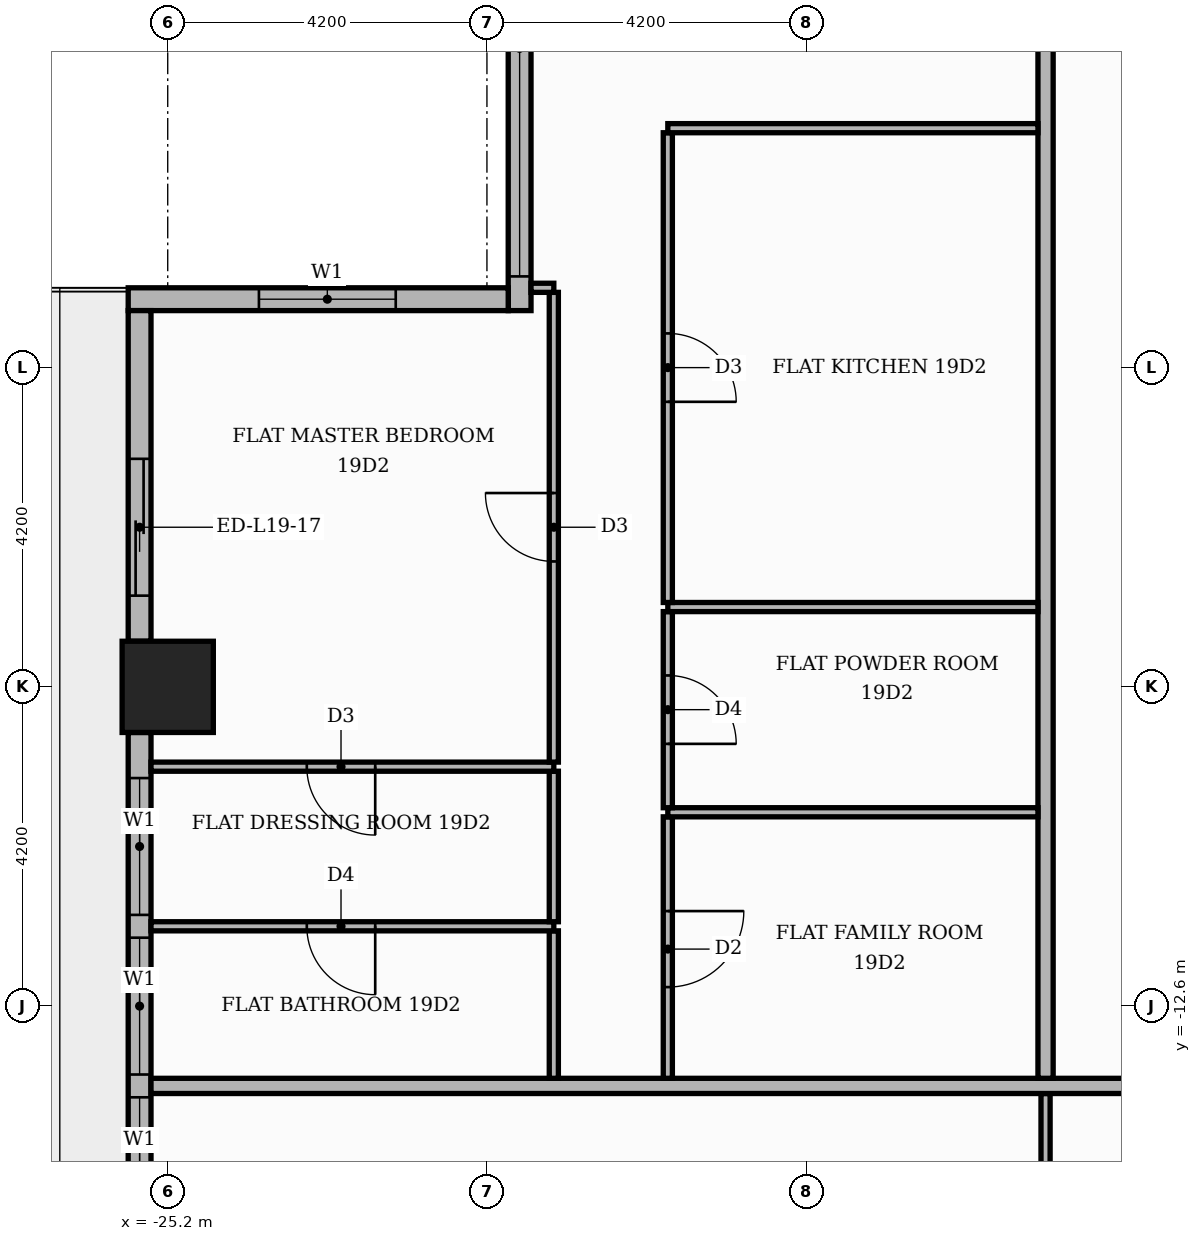
"""IFC4 building model, lengths in metres.
Left out: names, types, materials, properties, quantities, classifications, styles, units other than length and angle.
Written with IfcOpenShell. Run it as: python <this file> out.ifc"""

import sys

from ifc_helpers import new_model, si_unit, direction, frame, frame_2d, origin, origin_2d, place, context, subcontext, project, spatial, rectangle, extrude, element, fill, save


model = new_model("IFC4")
c1 = context("Model", 3, precision=1e-05, world=origin(), true_north=direction((0.0, 1.0)))
c2 = subcontext(c1, "Body", "Model", "MODEL_VIEW")
j1 = project(units=[si_unit("LENGTHUNIT", "METRE"), si_unit("PLANEANGLEUNIT", "RADIAN")], contexts=[c1])
p1 = place(None, origin())
s1 = spatial("IfcSite", under=j1, at=p1, CompositionType="ELEMENT")
p2 = place(p1, origin())
s2 = spatial("IfcBuilding", under=s1, at=p2, CompositionType="ELEMENT")
p3 = place(p2, frame((0.0, 0.0, 83.1)))
s3 = spatial("IfcBuildingStorey", under=s2, at=p3, CompositionType="ELEMENT", Elevation=83.1)
p4 = place(p3, frame((-25.2, -8.4, 0.0), z_axis=(0.0, 0.0, 1.0), x_axis=(1.0, 0.0, 0.0)))
e1 = element("IfcColumn", 1, at=p4, inside=s3, PredefinedType="COLUMN", context=c2, shape_type="SweptSolid", body=[
    extrude(rectangle(XDim=1.2, YDim=1.2, at=origin_2d()), origin(), (0.0, 0.0, 1.0), 3.9),
])
p5 = place(p3, frame((-20.57, 3.15, 0.0), z_axis=(0.0, 0.0, 1.0), x_axis=(0.0, -1.0, 0.0)))
e2 = element("IfcWall", 2, at=p5, inside=s3, PredefinedType="STANDARD", context=c2, shape_type="SweptSolid", body=[
    extrude(rectangle(XDim=6.6, YDim=0.3, at=frame_2d((3.3, 0.0))), origin(), (0.0, 0.0, 1.0), 3.48),
])
p6 = place(p5, frame((0.15, 0.0, 0.9)))
e3 = element("IfcOpeningElement", 3, at=p6, cuts=e2, PredefinedType="OPENING", context=c2, shape_type="SweptSolid", body=[
    extrude(rectangle(XDim=6.0, YDim=2.1, at=frame_2d((3.0, 1.05))), frame((0.0, 0.16, 0.0), z_axis=(0.0, -1.0, 0.0), x_axis=(1.0, 0.0, 0.0)), (0.0, 0.0, 1.0), 0.32),
])
p7 = place(p3, frame((-20.72, -3.3, 0.0), z_axis=(0.0, 0.0, 1.0), x_axis=(-1.0, 0.0, 0.0)))
e4 = element("IfcWall", 4, at=p7, inside=s3, PredefinedType="STANDARD", context=c2, shape_type="SweptSolid", body=[
    extrude(rectangle(XDim=5.0, YDim=0.3, at=frame_2d((2.5, 0.0))), origin(), (0.0, 0.0, 1.0), 3.48),
])
p8 = place(p7, frame((1.48, 0.0, 0.9)))
e5 = element("IfcOpeningElement", 5, at=p8, cuts=e4, PredefinedType="OPENING", context=c2, shape_type="SweptSolid", body=[
    extrude(rectangle(XDim=1.8, YDim=2.1, at=frame_2d((0.9, 1.05))), frame((0.0, 0.16, 0.0), z_axis=(0.0, -1.0, 0.0), x_axis=(1.0, 0.0, 0.0)), (0.0, 0.0, 1.0), 0.32),
])
p9 = place(p3, frame((-25.57, -3.45, 0.0), z_axis=(0.0, 0.0, 1.0), x_axis=(0.0, -1.0, 0.0)))
e6 = element("IfcWall", 6, at=p9, inside=s3, PredefinedType="STANDARD", context=c2, shape_type="SweptSolid", body=[
    extrude(rectangle(XDim=4.35, YDim=0.3, at=frame_2d((2.175, 0.0))), origin(), (0.0, 0.0, 1.0), 3.48),
])
p10 = place(p9, frame((1.95, 0.0, 0.0)))
e7 = element("IfcOpeningElement", 7, at=p10, cuts=e6, PredefinedType="OPENING", context=c2, shape_type="SweptSolid", body=[
    extrude(rectangle(XDim=1.8, YDim=2.4, at=frame_2d((0.9, 1.2))), frame((0.0, 0.16, 0.0), z_axis=(0.0, -1.0, 0.0), x_axis=(1.0, 0.0, 0.0)), (0.0, 0.0, 1.0), 0.32),
])
p11 = place(p3, frame((-25.57, -9.0, 0.0), z_axis=(0.0, 0.0, 1.0), x_axis=(0.0, -1.0, 0.0)))
e8 = element("IfcWall", 8, at=p11, inside=s3, PredefinedType="STANDARD", context=c2, shape_type="SweptSolid", body=[
    extrude(rectangle(XDim=7.2, YDim=0.3, at=frame_2d((3.6, 0.0))), origin(), (0.0, 0.0, 1.0), 3.48),
])
p12 = place(p11, frame((0.6, 0.0, 0.9)))
e9 = element("IfcOpeningElement", 9, at=p12, cuts=e8, PredefinedType="OPENING", context=c2, shape_type="SweptSolid", body=[
    extrude(rectangle(XDim=1.8, YDim=2.1, at=frame_2d((0.9, 1.05))), frame((0.0, 0.16, 0.0), z_axis=(0.0, -1.0, 0.0), x_axis=(1.0, 0.0, 0.0)), (0.0, 0.0, 1.0), 0.32),
])
p13 = place(p11, frame((2.7, 0.0, 0.9)))
e10 = element("IfcOpeningElement", 10, at=p13, cuts=e8, PredefinedType="OPENING", context=c2, shape_type="SweptSolid", body=[
    extrude(rectangle(XDim=1.8, YDim=2.1, at=frame_2d((0.9, 1.05))), frame((0.0, 0.16, 0.0), z_axis=(0.0, -1.0, 0.0), x_axis=(1.0, 0.0, 0.0)), (0.0, 0.0, 1.0), 0.32),
])
p14 = place(p11, frame((4.8, 0.0, 0.9)))
e11 = element("IfcOpeningElement", 11, at=p14, cuts=e8, PredefinedType="OPENING", context=c2, shape_type="SweptSolid", body=[
    extrude(rectangle(XDim=1.8, YDim=2.1, at=frame_2d((0.9, 1.05))), frame((0.0, 0.16, 0.0), z_axis=(0.0, -1.0, 0.0), x_axis=(1.0, 0.0, 0.0)), (0.0, 0.0, 1.0), 0.32),
])
p15 = place(p3, frame((-13.65, -20.66, 0.0), z_axis=(0.0, 0.0, 1.0), x_axis=(0.0, 1.0, 0.0)))
e12 = element("IfcWall", 12, at=p15, inside=s3, PredefinedType="PARTITIONING", context=c2, shape_type="SweptSolid", body=[
    extrude(rectangle(XDim=6.91, YDim=0.12, at=frame_2d((3.455, 0.0))), origin(), (0.0, 0.0, 1.0), 3.48),
])
p16 = place(p15, frame((3.025, 0.0, 0.0)))
e13 = element("IfcOpeningElement", 13, at=p16, cuts=e12, PredefinedType="OPENING", context=c2, shape_type="SweptSolid", body=[
    extrude(rectangle(XDim=0.9, YDim=2.1, at=frame_2d((0.45, 1.05))), frame((0.0, 0.07, 0.0), z_axis=(0.0, -1.0, 0.0), x_axis=(1.0, 0.0, 0.0)), (0.0, 0.0, 1.0), 0.14),
])
p17 = place(p3, frame((-25.42, -13.65, 0.0), z_axis=(0.0, 0.0, 1.0), x_axis=(1.0, 0.0, 0.0)))
e14 = element("IfcWall", 14, at=p17, inside=s3, PredefinedType="PARTITIONING", context=c2, shape_type="SweptSolid", body=[
    extrude(rectangle(XDim=39.07, YDim=0.2, at=frame_2d((19.535, 0.0))), origin(), (0.0, 0.0, 1.0), 3.48),
])
p18 = place(p17, frame((14.37, 0.0, 0.0)))
e15 = element("IfcOpeningElement", 15, at=p18, cuts=e14, PredefinedType="OPENING", context=c2, shape_type="SweptSolid", body=[
    extrude(rectangle(XDim=1.1, YDim=2.4, at=frame_2d((0.55, 1.2))), frame((0.0, 0.11, 0.0), z_axis=(0.0, -1.0, 0.0), x_axis=(1.0, 0.0, 0.0)), (0.0, 0.0, 1.0), 0.22),
])
p19 = place(p3, frame((-20.12, -13.55, 0.0), z_axis=(0.0, 0.0, 1.0), x_axis=(0.0, 1.0, 0.0)))
e16 = element("IfcWall", 16, at=p19, inside=s3, PredefinedType="PARTITIONING", context=c2, shape_type="SweptSolid", body=[
    extrude(rectangle(XDim=1.94, YDim=0.12, at=frame_2d((0.97, 0.0))), origin(), (0.0, 0.0, 1.0), 3.48),
])
p20 = place(p3, frame((-18.62, -13.55, 0.0), z_axis=(0.0, 0.0, 1.0), x_axis=(0.0, 1.0, 0.0)))
e17 = element("IfcWall", 17, at=p20, inside=s3, PredefinedType="PARTITIONING", context=c2, shape_type="SweptSolid", body=[
    extrude(rectangle(XDim=3.44, YDim=0.12, at=frame_2d((1.72, 0.0))), origin(), (0.0, 0.0, 1.0), 3.48),
])
p21 = place(p20, frame((1.2, 0.0, 0.0)))
e18 = element("IfcOpeningElement", 18, at=p21, cuts=e17, PredefinedType="OPENING", context=c2, shape_type="SweptSolid", body=[
    extrude(rectangle(XDim=1.0, YDim=2.1, at=frame_2d((0.5, 1.05))), frame((0.0, 0.07, 0.0), z_axis=(0.0, -1.0, 0.0), x_axis=(1.0, 0.0, 0.0)), (0.0, 0.0, 1.0), 0.14),
])
p22 = place(p3, frame((-13.65, -13.55, 0.0), z_axis=(0.0, 0.0, 1.0), x_axis=(0.0, 1.0, 0.0)))
e19 = element("IfcWall", 19, at=p22, inside=s3, PredefinedType="PARTITIONING", context=c2, shape_type="SweptSolid", body=[
    extrude(rectangle(XDim=18.7, YDim=0.2, at=frame_2d((9.35, 0.0))), origin(), (0.0, 0.0, 1.0), 3.48),
])
p23 = place(p22, frame((14.05, 0.0, 0.0)))
e20 = element("IfcOpeningElement", 20, at=p23, cuts=e19, PredefinedType="OPENING", context=c2, shape_type="SweptSolid", body=[
    extrude(rectangle(XDim=1.1, YDim=2.4, at=frame_2d((0.55, 1.2))), frame((0.0, 0.11, 0.0), z_axis=(0.0, -1.0, 0.0), x_axis=(1.0, 0.0, 0.0)), (0.0, 0.0, 1.0), 0.22),
])
p24 = place(p3, frame((-25.42, -11.55, 0.0), z_axis=(0.0, 0.0, 1.0), x_axis=(1.0, 0.0, 0.0)))
e21 = element("IfcWall", 21, at=p24, inside=s3, PredefinedType="PARTITIONING", context=c2, shape_type="SweptSolid", body=[
    extrude(rectangle(XDim=5.3, YDim=0.12, at=frame_2d((2.65, 0.0))), origin(), (0.0, 0.0, 1.0), 3.48),
])
p25 = place(p24, frame((2.05, 0.0, 0.0)))
e22 = element("IfcOpeningElement", 22, at=p25, cuts=e21, PredefinedType="OPENING", context=c2, shape_type="SweptSolid", body=[
    extrude(rectangle(XDim=0.9, YDim=2.1, at=frame_2d((0.45, 1.05))), frame((0.0, 0.07, 0.0), z_axis=(0.0, -1.0, 0.0), x_axis=(1.0, 0.0, 0.0)), (0.0, 0.0, 1.0), 0.14),
])
p26 = place(p3, frame((-20.12, -11.49, 0.0), z_axis=(0.0, 0.0, 1.0), x_axis=(0.0, 1.0, 0.0)))
e23 = element("IfcWall", 23, at=p26, inside=s3, PredefinedType="PARTITIONING", context=c2, shape_type="SweptSolid", body=[
    extrude(rectangle(XDim=1.98, YDim=0.12, at=frame_2d((0.99, 0.0))), origin(), (0.0, 0.0, 1.0), 3.48),
])
p27 = place(p3, frame((-18.62, -10.05, 0.0), z_axis=(0.0, 0.0, 1.0), x_axis=(1.0, 0.0, 0.0)))
e24 = element("IfcWall", 24, at=p27, inside=s3, PredefinedType="PARTITIONING", context=c2, shape_type="SweptSolid", body=[
    extrude(rectangle(XDim=4.87, YDim=0.12, at=frame_2d((2.435, 0.0))), origin(), (0.0, 0.0, 1.0), 3.48),
])
p28 = place(p3, frame((-18.62, -9.99, 0.0), z_axis=(0.0, 0.0, 1.0), x_axis=(0.0, 1.0, 0.0)))
e25 = element("IfcWall", 25, at=p28, inside=s3, PredefinedType="PARTITIONING", context=c2, shape_type="SweptSolid", body=[
    extrude(rectangle(XDim=2.58, YDim=0.12, at=frame_2d((1.29, 0.0))), origin(), (0.0, 0.0, 1.0), 3.48),
])
p29 = place(p28, frame((0.84, 0.0, 0.0)))
e26 = element("IfcOpeningElement", 26, at=p29, cuts=e25, PredefinedType="OPENING", context=c2, shape_type="SweptSolid", body=[
    extrude(rectangle(XDim=0.9, YDim=2.1, at=frame_2d((0.45, 1.05))), frame((0.0, 0.07, 0.0), z_axis=(0.0, -1.0, 0.0), x_axis=(1.0, 0.0, 0.0)), (0.0, 0.0, 1.0), 0.14),
])
p30 = place(p3, frame((-25.42, -9.45, 0.0), z_axis=(0.0, 0.0, 1.0), x_axis=(1.0, 0.0, 0.0)))
e27 = element("IfcWall", 27, at=p30, inside=s3, PredefinedType="PARTITIONING", context=c2, shape_type="SweptSolid", body=[
    extrude(rectangle(XDim=5.3, YDim=0.12, at=frame_2d((2.65, 0.0))), origin(), (0.0, 0.0, 1.0), 3.48),
])
p31 = place(p30, frame((2.05, 0.0, 0.0)))
e28 = element("IfcOpeningElement", 28, at=p31, cuts=e27, PredefinedType="OPENING", context=c2, shape_type="SweptSolid", body=[
    extrude(rectangle(XDim=0.9, YDim=2.1, at=frame_2d((0.45, 1.05))), frame((0.0, 0.07, 0.0), z_axis=(0.0, -1.0, 0.0), x_axis=(1.0, 0.0, 0.0)), (0.0, 0.0, 1.0), 0.14),
])
p32 = place(p3, frame((-20.12, -9.39, 0.0), z_axis=(0.0, 0.0, 1.0), x_axis=(0.0, 1.0, 0.0)))
e29 = element("IfcWall", 29, at=p32, inside=s3, PredefinedType="PARTITIONING", context=c2, shape_type="SweptSolid", body=[
    extrude(rectangle(XDim=6.18, YDim=0.12, at=frame_2d((3.09, 0.0))), origin(), (0.0, 0.0, 1.0), 3.48),
])
p33 = place(p32, frame((2.64, 0.0, 0.0)))
e30 = element("IfcOpeningElement", 30, at=p33, cuts=e29, PredefinedType="OPENING", context=c2, shape_type="SweptSolid", body=[
    extrude(rectangle(XDim=0.9, YDim=2.1, at=frame_2d((0.45, 1.05))), frame((0.0, 0.07, 0.0), z_axis=(0.0, -1.0, 0.0), x_axis=(1.0, 0.0, 0.0)), (0.0, 0.0, 1.0), 0.14),
])
p34 = place(p3, frame((-18.62, -7.35, 0.0), z_axis=(0.0, 0.0, 1.0), x_axis=(1.0, 0.0, 0.0)))
e31 = element("IfcWall", 31, at=p34, inside=s3, PredefinedType="PARTITIONING", context=c2, shape_type="SweptSolid", body=[
    extrude(rectangle(XDim=4.87, YDim=0.12, at=frame_2d((2.435, 0.0))), origin(), (0.0, 0.0, 1.0), 3.48),
])
p35 = place(p3, frame((-18.62, -7.29, 0.0), z_axis=(0.0, 0.0, 1.0), x_axis=(0.0, 1.0, 0.0)))
e32 = element("IfcWall", 32, at=p35, inside=s3, PredefinedType="PARTITIONING", context=c2, shape_type="SweptSolid", body=[
    extrude(rectangle(XDim=6.18, YDim=0.12, at=frame_2d((3.09, 0.0))), origin(), (0.0, 0.0, 1.0), 3.48),
])
p36 = place(p35, frame((2.64, 0.0, 0.0)))
e33 = element("IfcOpeningElement", 33, at=p36, cuts=e32, PredefinedType="OPENING", context=c2, shape_type="SweptSolid", body=[
    extrude(rectangle(XDim=0.9, YDim=2.1, at=frame_2d((0.45, 1.05))), frame((0.0, 0.07, 0.0), z_axis=(0.0, -1.0, 0.0), x_axis=(1.0, 0.0, 0.0)), (0.0, 0.0, 1.0), 0.14),
])
p37 = place(p3, frame((-20.42, -3.15, 0.0), z_axis=(0.0, 0.0, 1.0), x_axis=(1.0, 0.0, 0.0)))
e34 = element("IfcWall", 34, at=p37, inside=s3, PredefinedType="PARTITIONING", context=c2, shape_type="SweptSolid", body=[
    extrude(rectangle(XDim=0.3, YDim=0.12, at=frame_2d((0.15, 0.0))), origin(), (0.0, 0.0, 1.0), 3.48),
])
p38 = place(p3, frame((-18.62, -1.05, 0.0), z_axis=(0.0, 0.0, 1.0), x_axis=(1.0, 0.0, 0.0)))
e35 = element("IfcWall", 35, at=p38, inside=s3, PredefinedType="PARTITIONING", context=c2, shape_type="SweptSolid", body=[
    extrude(rectangle(XDim=4.87, YDim=0.12, at=frame_2d((2.435, 0.0))), origin(), (0.0, 0.0, 1.0), 3.48),
])
p39 = place(p6, origin())
e36 = element("IfcWindow", 36, at=p39, inside=s3, PartitioningType="SINGLE_PANEL", PredefinedType="WINDOW", context=c2, shape_type="SweptSolid", body=[
    extrude(rectangle(XDim=6.0, YDim=2.1, at=frame_2d((3.0, 1.05))), frame((0.0, 0.03, 0.0), z_axis=(0.0, -1.0, 0.0), x_axis=(1.0, 0.0, 0.0)), (0.0, 0.0, 1.0), 0.06),
])
fill(e3, e36)
p40 = place(p8, origin())
e37 = element("IfcWindow", 37, at=p40, inside=s3, PartitioningType="SINGLE_PANEL", PredefinedType="WINDOW", context=c2, shape_type="SweptSolid", body=[
    extrude(rectangle(XDim=1.8, YDim=2.1, at=frame_2d((0.9, 1.05))), frame((0.0, 0.03, 0.0), z_axis=(0.0, -1.0, 0.0), x_axis=(1.0, 0.0, 0.0)), (0.0, 0.0, 1.0), 0.06),
])
fill(e5, e37)
p41 = place(p10, origin())
e38 = element("IfcDoor", 38, at=p41, inside=s3, OperationType="SLIDING_TO_RIGHT", PredefinedType="DOOR", context=c2, shape_type="SweptSolid", body=[
    extrude(rectangle(XDim=1.8, YDim=2.4, at=frame_2d((0.9, 1.2))), frame((0.0, 0.025, 0.0), z_axis=(0.0, -1.0, 0.0), x_axis=(1.0, 0.0, 0.0)), (0.0, 0.0, 1.0), 0.05),
])
fill(e7, e38)
p42 = place(p12, origin())
e39 = element("IfcWindow", 39, at=p42, inside=s3, PartitioningType="SINGLE_PANEL", PredefinedType="WINDOW", context=c2, shape_type="SweptSolid", body=[
    extrude(rectangle(XDim=1.8, YDim=2.1, at=frame_2d((0.9, 1.05))), frame((0.0, 0.03, 0.0), z_axis=(0.0, -1.0, 0.0), x_axis=(1.0, 0.0, 0.0)), (0.0, 0.0, 1.0), 0.06),
])
fill(e9, e39)
p43 = place(p13, origin())
e40 = element("IfcWindow", 40, at=p43, inside=s3, PartitioningType="SINGLE_PANEL", PredefinedType="WINDOW", context=c2, shape_type="SweptSolid", body=[
    extrude(rectangle(XDim=1.8, YDim=2.1, at=frame_2d((0.9, 1.05))), frame((0.0, 0.03, 0.0), z_axis=(0.0, -1.0, 0.0), x_axis=(1.0, 0.0, 0.0)), (0.0, 0.0, 1.0), 0.06),
])
fill(e10, e40)
p44 = place(p14, origin())
e41 = element("IfcWindow", 41, at=p44, inside=s3, PartitioningType="SINGLE_PANEL", PredefinedType="WINDOW", context=c2, shape_type="SweptSolid", body=[
    extrude(rectangle(XDim=1.8, YDim=2.1, at=frame_2d((0.9, 1.05))), frame((0.0, 0.03, 0.0), z_axis=(0.0, -1.0, 0.0), x_axis=(1.0, 0.0, 0.0)), (0.0, 0.0, 1.0), 0.06),
])
fill(e11, e41)
p45 = place(p36, frame((0.9, 0.0, 0.0), z_axis=(0.0, 0.0, 1.0), x_axis=(-1.0, 0.0, 0.0)))
e42 = element("IfcDoor", 42, at=p45, inside=s3, OperationType="SINGLE_SWING_LEFT", PredefinedType="DOOR", context=c2, shape_type="SweptSolid", body=[
    extrude(rectangle(XDim=0.9, YDim=2.1, at=frame_2d((0.45, 1.05))), frame((0.0, 0.025, 0.0), z_axis=(0.0, -1.0, 0.0), x_axis=(1.0, 0.0, 0.0)), (0.0, 0.0, 1.0), 0.05),
])
fill(e33, e42)
p46 = place(p29, frame((0.9, 0.0, 0.0), z_axis=(0.0, 0.0, 1.0), x_axis=(-1.0, 0.0, 0.0)))
e43 = element("IfcDoor", 43, at=p46, inside=s3, OperationType="SINGLE_SWING_LEFT", PredefinedType="DOOR", context=c2, shape_type="SweptSolid", body=[
    extrude(rectangle(XDim=0.9, YDim=2.1, at=frame_2d((0.45, 1.05))), frame((0.0, 0.025, 0.0), z_axis=(0.0, -1.0, 0.0), x_axis=(1.0, 0.0, 0.0)), (0.0, 0.0, 1.0), 0.05),
])
fill(e26, e43)
p47 = place(p21, frame((1.0, 0.0, 0.0), z_axis=(0.0, 0.0, 1.0), x_axis=(-1.0, 0.0, 0.0)))
e44 = element("IfcDoor", 44, at=p47, inside=s3, OperationType="SINGLE_SWING_RIGHT", PredefinedType="DOOR", context=c2, shape_type="SweptSolid", body=[
    extrude(rectangle(XDim=1.0, YDim=2.1, at=frame_2d((0.5, 1.05))), frame((0.0, 0.025, 0.0), z_axis=(0.0, -1.0, 0.0), x_axis=(1.0, 0.0, 0.0)), (0.0, 0.0, 1.0), 0.05),
])
fill(e18, e44)
p48 = place(p33, origin())
e45 = element("IfcDoor", 45, at=p48, inside=s3, OperationType="SINGLE_SWING_RIGHT", PredefinedType="DOOR", context=c2, shape_type="SweptSolid", body=[
    extrude(rectangle(XDim=0.9, YDim=2.1, at=frame_2d((0.45, 1.05))), frame((0.0, 0.025, 0.0), z_axis=(0.0, -1.0, 0.0), x_axis=(1.0, 0.0, 0.0)), (0.0, 0.0, 1.0), 0.05),
])
fill(e30, e45)
p49 = place(p31, frame((0.9, 0.0, 0.0), z_axis=(0.0, 0.0, 1.0), x_axis=(-1.0, 0.0, 0.0)))
e46 = element("IfcDoor", 46, at=p49, inside=s3, OperationType="SINGLE_SWING_RIGHT", PredefinedType="DOOR", context=c2, shape_type="SweptSolid", body=[
    extrude(rectangle(XDim=0.9, YDim=2.1, at=frame_2d((0.45, 1.05))), frame((0.0, 0.025, 0.0), z_axis=(0.0, -1.0, 0.0), x_axis=(1.0, 0.0, 0.0)), (0.0, 0.0, 1.0), 0.05),
])
fill(e28, e46)
p50 = place(p25, frame((0.9, 0.0, 0.0), z_axis=(0.0, 0.0, 1.0), x_axis=(-1.0, 0.0, 0.0)))
e47 = element("IfcDoor", 47, at=p50, inside=s3, OperationType="SINGLE_SWING_RIGHT", PredefinedType="DOOR", context=c2, shape_type="SweptSolid", body=[
    extrude(rectangle(XDim=0.9, YDim=2.1, at=frame_2d((0.45, 1.05))), frame((0.0, 0.025, 0.0), z_axis=(0.0, -1.0, 0.0), x_axis=(1.0, 0.0, 0.0)), (0.0, 0.0, 1.0), 0.05),
])
fill(e22, e47)
save(model, sys.argv[1])
